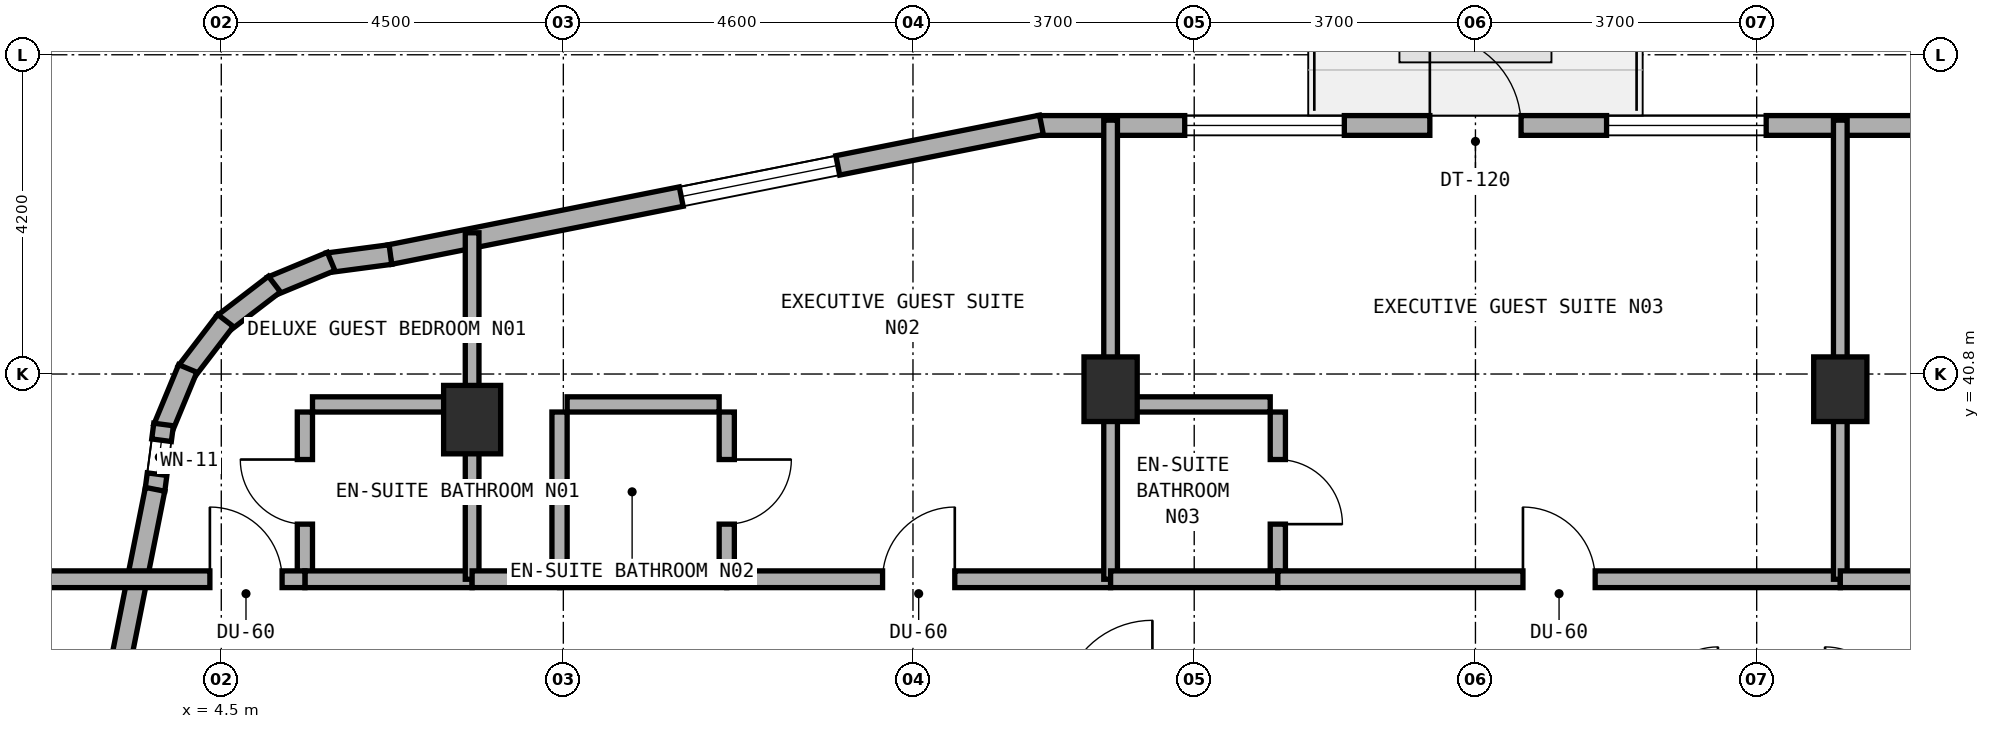
"""IFC4 building model, lengths in metres.
Left out: names, types, materials, properties, quantities, classifications, styles, units other than length and angle.
Written with IfcOpenShell. Run it as: python <this file> out.ifc"""

import sys

from ifc_helpers import new_model, si_unit, direction, frame, frame_2d, origin, origin_2d, place, context, subcontext, project, spatial, rectangle, extrude, element, fill, save


model = new_model("IFC4")
c1 = context("Model", 3, precision=1e-05, world=origin(), true_north=direction((0.0, 1.0)))
c2 = subcontext(c1, "Body", "Model", "MODEL_VIEW")
j1 = project(units=[si_unit("LENGTHUNIT", "METRE"), si_unit("PLANEANGLEUNIT", "RADIAN")], contexts=[c1])
p1 = place(None, origin())
s1 = spatial("IfcSite", under=j1, at=p1, CompositionType="ELEMENT")
p2 = place(p1, origin())
s2 = spatial("IfcBuilding", under=s1, at=p2, CompositionType="ELEMENT")
p3 = place(p2, frame((0.0, 0.0, 220.7)))
s3 = spatial("IfcBuildingStorey", under=s2, at=p3, CompositionType="ELEMENT", Elevation=220.7)
for number, where, z_axis, x_axis in (
    (1, (16.2, 40.6, 0.0), (0.0, 0.0, 1.0), (1.0, 0.0, 0.0)),
    (2, (25.8, 40.6, 0.0), (0.0, 0.0, 1.0), (1.0, 0.0, 0.0)),
):
    element("IfcColumn", number, at=place(p3, frame(where, z_axis=z_axis, x_axis=x_axis)), inside=s3, PredefinedType="COLUMN", context=c2, shape_type="SweptSolid", body=[
        extrude(rectangle(XDim=0.7, YDim=0.85, at=origin_2d()), origin(), (0.0, 0.0, 1.0), 3.6),
    ])
p4 = place(p3, frame((7.8, 40.2, 0.0), z_axis=(0.0, 0.0, 1.0), x_axis=(1.0, 0.0, 0.0)))
e3 = element("IfcColumn", 3, at=p4, inside=s3, PredefinedType="COLUMN", context=c2, shape_type="SweptSolid", body=[
    extrude(rectangle(XDim=0.75, YDim=0.9, at=origin_2d()), origin(), (0.0, 0.0, 1.0), 3.6),
])
p5 = place(p3, frame((35.283, 42.371, 0.0), z_axis=(0.0, 0.0, 1.0), x_axis=(-0.980748582507, 0.1952747242, 0.0)))
e4 = element("IfcWall", 4, at=p5, inside=s3, PredefinedType="STANDARD", context=c2, shape_type="SweptSolid", body=[
    extrude(rectangle(XDim=8.705, YDim=0.26, at=frame_2d((4.353, 0.0))), origin(), (0.0, 0.0, 1.0), 3.32),
])
p6 = place(p5, frame((3.892, 0.0, 0.85)))
e5 = element("IfcOpeningElement", 5, at=p6, cuts=e4, PredefinedType="OPENING", context=c2, shape_type="SweptSolid", body=[
    extrude(rectangle(XDim=2.1, YDim=1.5, at=frame_2d((1.05, 0.75))), frame((0.0, 0.14, 0.0), z_axis=(0.0, -1.0, 0.0), x_axis=(1.0, 0.0, 0.0)), (0.0, 0.0, 1.0), 0.28),
])
p7 = place(p3, frame((26.785, 44.07, 0.0), z_axis=(0.0, 0.0, 1.0), x_axis=(-1.0, 0.0, 0.0)))
e6 = element("IfcWall", 6, at=p7, inside=s3, PredefinedType="STANDARD", context=c2, shape_type="SweptSolid", body=[
    extrude(rectangle(XDim=11.535, YDim=0.26, at=frame_2d((5.768, 0.0))), origin(), (0.0, 0.0, 1.0), 3.32),
])
p8 = place(p7, frame((5.185, 0.0, 0.0)))
e7 = element("IfcOpeningElement", 7, at=p8, cuts=e6, PredefinedType="OPENING", context=c2, shape_type="SweptSolid", body=[
    extrude(rectangle(XDim=1.2, YDim=2.15, at=frame_2d((0.6, 1.075))), frame((0.0, 0.14, 0.0), z_axis=(0.0, -1.0, 0.0), x_axis=(1.0, 0.0, 0.0)), (0.0, 0.0, 1.0), 0.28),
])
p9 = place(p7, frame((1.96, 0.0, 0.85)))
e8 = element("IfcOpeningElement", 8, at=p9, cuts=e6, PredefinedType="OPENING", context=c2, shape_type="SweptSolid", body=[
    extrude(rectangle(XDim=2.1, YDim=1.5, at=frame_2d((1.05, 0.75))), frame((0.0, 0.14, 0.0), z_axis=(0.0, -1.0, 0.0), x_axis=(1.0, 0.0, 0.0)), (0.0, 0.0, 1.0), 0.28),
])
p10 = place(p7, frame((7.51, 0.0, 0.85)))
e9 = element("IfcOpeningElement", 9, at=p10, cuts=e6, PredefinedType="OPENING", context=c2, shape_type="SweptSolid", body=[
    extrude(rectangle(XDim=2.1, YDim=1.5, at=frame_2d((1.05, 0.75))), frame((0.0, 0.14, 0.0), z_axis=(0.0, -1.0, 0.0), x_axis=(1.0, 0.0, 0.0)), (0.0, 0.0, 1.0), 0.28),
])
p11 = place(p3, frame((15.29, 44.078, 0.0), z_axis=(0.0, 0.0, 1.0), x_axis=(-0.980752174324, -0.195256683773, 0.0)))
e10 = element("IfcWall", 10, at=p11, inside=s3, PredefinedType="STANDARD", context=c2, shape_type="SweptSolid", body=[
    extrude(rectangle(XDim=8.741, YDim=0.26, at=frame_2d((4.371, 0.0))), origin(), (0.0, 0.0, 1.0), 3.32),
])
p12 = place(p11, frame((2.732, 0.0, 0.85)))
e11 = element("IfcOpeningElement", 11, at=p12, cuts=e10, PredefinedType="OPENING", context=c2, shape_type="SweptSolid", body=[
    extrude(rectangle(XDim=2.1, YDim=1.5, at=frame_2d((1.05, 0.75))), frame((0.0, 0.14, 0.0), z_axis=(0.0, -1.0, 0.0), x_axis=(1.0, 0.0, 0.0)), (0.0, 0.0, 1.0), 0.28),
])
p13 = place(p3, frame((6.725, 42.372, 0.0), z_axis=(0.0, 0.0, 1.0), x_axis=(-0.9913883573, -0.130954667764, 0.0)))
e12 = element("IfcWall", 12, at=p13, inside=s3, PredefinedType="STANDARD", context=c2, shape_type="SweptSolid", body=[
    extrude(rectangle(XDim=0.833, YDim=0.26, at=frame_2d((0.417, 0.0))), origin(), (0.0, 0.0, 1.0), 3.32),
])
p14 = place(p3, frame((5.945, 42.281, 0.0), z_axis=(0.0, 0.0, 1.0), x_axis=(-0.923754491172, -0.382985169477, 0.0)))
e13 = element("IfcWall", 13, at=p14, inside=s3, PredefinedType="STANDARD", context=c2, shape_type="SweptSolid", body=[
    extrude(rectangle(XDim=0.851, YDim=0.26, at=frame_2d((0.426, 0.0))), origin(), (0.0, 0.0, 1.0), 3.32),
])
for number, where, z_axis, x_axis in (
    (14, (5.199, 41.983, 0.0), (0.0, 0.0, 1.0), (-0.794, -0.608, 0.0)),
    (15, (4.555, 41.504, 0.0), (0.0, 0.0, 1.0), (-0.608, -0.794, 0.0)),
):
    element("IfcWall", number, at=place(p3, frame(where, z_axis=z_axis, x_axis=x_axis)), inside=s3, PredefinedType="STANDARD", context=c2, shape_type="SweptSolid", body=[
        extrude(rectangle(XDim=0.85, YDim=0.26, at=frame_2d((0.425, 0.0))), origin(), (0.0, 0.0, 1.0), 3.32),
    ])
p15 = place(p3, frame((4.059, 40.873, 0.0), z_axis=(0.0, 0.0, 1.0), x_axis=(-0.383229930484, -0.923652976167, 0.0)))
e16 = element("IfcWall", 16, at=p15, inside=s3, PredefinedType="STANDARD", context=c2, shape_type="SweptSolid", body=[
    extrude(rectangle(XDim=0.851, YDim=0.26, at=frame_2d((0.426, 0.0))), origin(), (0.0, 0.0, 1.0), 3.32),
])
p16 = place(p3, frame((3.741, 40.136, 0.0), z_axis=(0.0, 0.0, 1.0), x_axis=(-0.130156359936, -0.991493480548, 0.0)))
e17 = element("IfcWall", 17, at=p16, inside=s3, PredefinedType="STANDARD", context=c2, shape_type="SweptSolid", body=[
    extrude(rectangle(XDim=0.868, YDim=0.26, at=frame_2d((0.434, 0.0))), origin(), (0.0, 0.0, 1.0), 3.32),
])
p17 = place(p16, frame((0.209, 0.0, 0.85)))
e18 = element("IfcOpeningElement", 18, at=p17, cuts=e17, PredefinedType="OPENING", context=c2, shape_type="SweptSolid", body=[
    extrude(rectangle(XDim=0.45, YDim=1.5, at=frame_2d((0.225, 0.75))), frame((0.0, 0.14, 0.0), z_axis=(0.0, -1.0, 0.0), x_axis=(1.0, 0.0, 0.0)), (0.0, 0.0, 1.0), 0.28),
])
p18 = place(p3, frame((3.629, 39.283, 0.0), z_axis=(0.0, 0.0, 1.0), x_axis=(-0.195291715883, -0.980745199176, 0.0)))
e19 = element("IfcWall", 19, at=p18, inside=s3, PredefinedType="STANDARD", context=c2, shape_type="SweptSolid", body=[
    extrude(rectangle(XDim=8.771, YDim=0.26, at=frame_2d((4.385, 0.0))), origin(), (0.0, 0.0, 1.0), 3.32),
])
p19 = place(p18, frame((4.0, 0.0, 0.85)))
e20 = element("IfcOpeningElement", 20, at=p19, cuts=e19, PredefinedType="OPENING", context=c2, shape_type="SweptSolid", body=[
    extrude(rectangle(XDim=2.1, YDim=1.5, at=frame_2d((1.05, 0.75))), frame((0.0, 0.14, 0.0), z_axis=(0.0, -1.0, 0.0), x_axis=(1.0, 0.0, 0.0)), (0.0, 0.0, 1.0), 0.28),
])
p20 = place(p3, frame((5.6, 38.2, 0.0), z_axis=(0.0, 0.0, 1.0), x_axis=(0.0, 1.0, 0.0)))
e21 = element("IfcWall", 21, at=p20, inside=s3, PredefinedType="PLUMBINGWALL", context=c2, shape_type="SweptSolid", body=[
    extrude(rectangle(XDim=2.1, YDim=0.2, at=frame_2d((1.05, 0.0))), origin(), (0.0, 0.0, 1.0), 3.32),
])
p21 = place(p20, frame((0.625, 0.0, 0.0)))
e22 = element("IfcOpeningElement", 22, at=p21, cuts=e21, PredefinedType="OPENING", context=c2, shape_type="SweptSolid", body=[
    extrude(rectangle(XDim=0.85, YDim=2.1, at=frame_2d((0.425, 1.05))), frame((0.0, 0.11, 0.0), z_axis=(0.0, -1.0, 0.0), x_axis=(1.0, 0.0, 0.0)), (0.0, 0.0, 1.0), 0.22),
])
p22 = place(p3, frame((5.7, 40.4, 0.0), z_axis=(0.0, 0.0, 1.0), x_axis=(1.0, 0.0, 0.0)))
e23 = element("IfcWall", 23, at=p22, inside=s3, PredefinedType="PLUMBINGWALL", context=c2, shape_type="SweptSolid", body=[
    extrude(rectangle(XDim=2.0, YDim=0.2, at=frame_2d((1.0, 0.0))), origin(), (0.0, 0.0, 1.0), 3.32),
])
p23 = place(p3, frame((5.6, 38.1, 0.0), z_axis=(0.0, 0.0, 1.0), x_axis=(1.0, 0.0, 0.0)))
e24 = element("IfcWall", 24, at=p23, inside=s3, PredefinedType="SOLIDWALL", context=c2, shape_type="SweptSolid", body=[
    extrude(rectangle(XDim=2.2, YDim=0.22, at=frame_2d((1.1, 0.0))), origin(), (0.0, 0.0, 1.0), 2.695),
])
p24 = place(p3, frame((1.96, 38.1, 0.0), z_axis=(0.0, 0.0, 1.0), x_axis=(1.0, 0.0, 0.0)))
e25 = element("IfcWall", 25, at=p24, inside=s3, PredefinedType="SOLIDWALL", context=c2, shape_type="SweptSolid", body=[
    extrude(rectangle(XDim=3.64, YDim=0.22, at=frame_2d((1.82, 0.0))), origin(), (0.0, 0.0, 1.0), 3.32),
])
p25 = place(p24, frame((2.39, 0.0, 0.0)))
e26 = element("IfcOpeningElement", 26, at=p25, cuts=e25, PredefinedType="OPENING", context=c2, shape_type="SweptSolid", body=[
    extrude(rectangle(XDim=0.95, YDim=2.1, at=frame_2d((0.475, 1.05))), frame((0.0, 0.12, 0.0), z_axis=(0.0, -1.0, 0.0), x_axis=(1.0, 0.0, 0.0)), (0.0, 0.0, 1.0), 0.24),
])
p26 = place(p3, frame((7.8, 38.1, 0.0), z_axis=(0.0, 0.0, 1.0), x_axis=(0.0, 1.0, 0.0)))
e27 = element("IfcWall", 27, at=p26, inside=s3, PredefinedType="SOLIDWALL", context=c2, shape_type="SweptSolid", body=[
    extrude(rectangle(XDim=4.558, YDim=0.18, at=frame_2d((2.279, 0.0))), origin(), (0.0, 0.0, 1.0), 2.695),
])
p27 = place(p3, frame((11.15, 38.2, 0.0), z_axis=(0.0, 0.0, 1.0), x_axis=(0.0, 1.0, 0.0)))
e28 = element("IfcWall", 28, at=p27, inside=s3, PredefinedType="PLUMBINGWALL", context=c2, shape_type="SweptSolid", body=[
    extrude(rectangle(XDim=2.1, YDim=0.2, at=frame_2d((1.05, 0.0))), origin(), (0.0, 0.0, 1.0), 3.015),
])
p28 = place(p27, frame((0.625, 0.0, 0.0)))
e29 = element("IfcOpeningElement", 29, at=p28, cuts=e28, PredefinedType="OPENING", context=c2, shape_type="SweptSolid", body=[
    extrude(rectangle(XDim=0.85, YDim=2.1, at=frame_2d((0.425, 1.05))), frame((0.0, 0.11, 0.0), z_axis=(0.0, -1.0, 0.0), x_axis=(1.0, 0.0, 0.0)), (0.0, 0.0, 1.0), 0.22),
])
p29 = place(p3, frame((9.05, 40.4, 0.0), z_axis=(0.0, 0.0, 1.0), x_axis=(1.0, 0.0, 0.0)))
e30 = element("IfcWall", 30, at=p29, inside=s3, PredefinedType="PLUMBINGWALL", context=c2, shape_type="SweptSolid", body=[
    extrude(rectangle(XDim=2.0, YDim=0.2, at=frame_2d((1.0, 0.0))), origin(), (0.0, 0.0, 1.0), 3.015),
])
p30 = place(p3, frame((8.95, 38.2, 0.0), z_axis=(0.0, 0.0, 1.0), x_axis=(0.0, 1.0, 0.0)))
e31 = element("IfcWall", 31, at=p30, inside=s3, PredefinedType="PLUMBINGWALL", context=c2, shape_type="SweptSolid", body=[
    extrude(rectangle(XDim=2.1, YDim=0.2, at=frame_2d((1.05, 0.0))), origin(), (0.0, 0.0, 1.0), 3.015),
])
p31 = place(p3, frame((7.8, 38.1, 0.0), z_axis=(0.0, 0.0, 1.0), x_axis=(1.0, 0.0, 0.0)))
e32 = element("IfcWall", 32, at=p31, inside=s3, PredefinedType="SOLIDWALL", context=c2, shape_type="SweptSolid", body=[
    extrude(rectangle(XDim=1.15, YDim=0.22, at=frame_2d((0.575, 0.0))), origin(), (0.0, 0.0, 1.0), 2.695),
])
p32 = place(p3, frame((8.95, 38.1, 0.0), z_axis=(0.0, 0.0, 1.0), x_axis=(1.0, 0.0, 0.0)))
e33 = element("IfcWall", 33, at=p32, inside=s3, PredefinedType="SOLIDWALL", context=c2, shape_type="SweptSolid", body=[
    extrude(rectangle(XDim=2.2, YDim=0.22, at=frame_2d((1.1, 0.0))), origin(), (0.0, 0.0, 1.0), 3.32),
])
p33 = place(p3, frame((11.15, 38.1, 0.0), z_axis=(0.0, 0.0, 1.0), x_axis=(1.0, 0.0, 0.0)))
e34 = element("IfcWall", 34, at=p33, inside=s3, PredefinedType="SOLIDWALL", context=c2, shape_type="SweptSolid", body=[
    extrude(rectangle(XDim=5.05, YDim=0.22, at=frame_2d((2.525, 0.0))), origin(), (0.0, 0.0, 1.0), 2.695),
])
p34 = place(p33, frame((2.05, 0.0, 0.0)))
e35 = element("IfcOpeningElement", 35, at=p34, cuts=e34, PredefinedType="OPENING", context=c2, shape_type="SweptSolid", body=[
    extrude(rectangle(XDim=0.95, YDim=2.1, at=frame_2d((0.475, 1.05))), frame((0.0, 0.12, 0.0), z_axis=(0.0, -1.0, 0.0), x_axis=(1.0, 0.0, 0.0)), (0.0, 0.0, 1.0), 0.24),
])
p35 = place(p3, frame((16.2, 38.1, 0.0), z_axis=(0.0, 0.0, 1.0), x_axis=(0.0, 1.0, 0.0)))
e36 = element("IfcWall", 36, at=p35, inside=s3, PredefinedType="SOLIDWALL", context=c2, shape_type="SweptSolid", body=[
    extrude(rectangle(XDim=6.04, YDim=0.18, at=frame_2d((3.02, 0.0))), origin(), (0.0, 0.0, 1.0), 2.695),
])
p36 = place(p3, frame((18.4, 38.2, 0.0), z_axis=(0.0, 0.0, 1.0), x_axis=(0.0, 1.0, 0.0)))
e37 = element("IfcWall", 37, at=p36, inside=s3, PredefinedType="PLUMBINGWALL", context=c2, shape_type="SweptSolid", body=[
    extrude(rectangle(XDim=2.1, YDim=0.2, at=frame_2d((1.05, 0.0))), origin(), (0.0, 0.0, 1.0), 3.025),
])
p37 = place(p36, frame((0.625, 0.0, 0.0)))
e38 = element("IfcOpeningElement", 38, at=p37, cuts=e37, PredefinedType="OPENING", context=c2, shape_type="SweptSolid", body=[
    extrude(rectangle(XDim=0.85, YDim=2.1, at=frame_2d((0.425, 1.05))), frame((0.0, 0.11, 0.0), z_axis=(0.0, -1.0, 0.0), x_axis=(1.0, 0.0, 0.0)), (0.0, 0.0, 1.0), 0.22),
])
p38 = place(p3, frame((16.3, 40.4, 0.0), z_axis=(0.0, 0.0, 1.0), x_axis=(1.0, 0.0, 0.0)))
e39 = element("IfcWall", 39, at=p38, inside=s3, PredefinedType="PLUMBINGWALL", context=c2, shape_type="SweptSolid", body=[
    extrude(rectangle(XDim=2.0, YDim=0.2, at=frame_2d((1.0, 0.0))), origin(), (0.0, 0.0, 1.0), 3.015),
])
p39 = place(p3, frame((16.2, 38.1, 0.0), z_axis=(0.0, 0.0, 1.0), x_axis=(1.0, 0.0, 0.0)))
e40 = element("IfcWall", 40, at=p39, inside=s3, PredefinedType="SOLIDWALL", context=c2, shape_type="SweptSolid", body=[
    extrude(rectangle(XDim=2.2, YDim=0.22, at=frame_2d((1.1, 0.0))), origin(), (0.0, 0.0, 1.0), 2.695),
])
p40 = place(p3, frame((18.4, 38.1, 0.0), z_axis=(0.0, 0.0, 1.0), x_axis=(1.0, 0.0, 0.0)))
e41 = element("IfcWall", 41, at=p40, inside=s3, PredefinedType="SOLIDWALL", context=c2, shape_type="SweptSolid", body=[
    extrude(rectangle(XDim=7.4, YDim=0.22, at=frame_2d((3.7, 0.0))), origin(), (0.0, 0.0, 1.0), 2.695),
])
p41 = place(p40, frame((3.225, 0.0, 0.0)))
e42 = element("IfcOpeningElement", 42, at=p41, cuts=e41, PredefinedType="OPENING", context=c2, shape_type="SweptSolid", body=[
    extrude(rectangle(XDim=0.95, YDim=2.1, at=frame_2d((0.475, 1.05))), frame((0.0, 0.12, 0.0), z_axis=(0.0, -1.0, 0.0), x_axis=(1.0, 0.0, 0.0)), (0.0, 0.0, 1.0), 0.24),
])
p42 = place(p3, frame((25.8, 38.1, 0.0), z_axis=(0.0, 0.0, 1.0), x_axis=(0.0, 1.0, 0.0)))
e43 = element("IfcWall", 43, at=p42, inside=s3, PredefinedType="SOLIDWALL", context=c2, shape_type="SweptSolid", body=[
    extrude(rectangle(XDim=6.04, YDim=0.18, at=frame_2d((3.02, 0.0))), origin(), (0.0, 0.0, 1.0), 2.695),
])
p43 = place(p3, frame((25.8, 38.1, 0.0), z_axis=(0.0, 0.0, 1.0), x_axis=(1.0, 0.0, 0.0)))
e44 = element("IfcWall", 44, at=p43, inside=s3, PredefinedType="SOLIDWALL", context=c2, shape_type="SweptSolid", body=[
    extrude(rectangle(XDim=5.05, YDim=0.22, at=frame_2d((2.525, 0.0))), origin(), (0.0, 0.0, 1.0), 2.695),
])
p44 = place(p43, frame((2.05, 0.0, 0.0)))
e45 = element("IfcOpeningElement", 45, at=p44, cuts=e44, PredefinedType="OPENING", context=c2, shape_type="SweptSolid", body=[
    extrude(rectangle(XDim=0.95, YDim=2.1, at=frame_2d((0.475, 1.05))), frame((0.0, 0.12, 0.0), z_axis=(0.0, -1.0, 0.0), x_axis=(1.0, 0.0, 0.0)), (0.0, 0.0, 1.0), 0.24),
])
p45 = place(p8, frame((1.2, 0.0, 0.0), z_axis=(0.0, 0.0, 1.0), x_axis=(-1.0, 0.0, 0.0)))
e46 = element("IfcDoor", 46, at=p45, inside=s3, OperationType="SINGLE_SWING_LEFT", PredefinedType="DOOR", context=c2, shape_type="SweptSolid", body=[
    extrude(rectangle(XDim=1.2, YDim=2.15, at=frame_2d((0.6, 1.075))), frame((0.0, 0.025, 0.0), z_axis=(0.0, -1.0, 0.0), x_axis=(1.0, 0.0, 0.0)), (0.0, 0.0, 1.0), 0.05),
])
fill(e7, e46)
p46 = place(p9, origin())
e47 = element("IfcWindow", 47, at=p46, inside=s3, PartitioningType="SINGLE_PANEL", PredefinedType="WINDOW", context=c2, shape_type="SweptSolid", body=[
    extrude(rectangle(XDim=2.1, YDim=1.5, at=frame_2d((1.05, 0.75))), frame((0.0, 0.03, 0.0), z_axis=(0.0, -1.0, 0.0), x_axis=(1.0, 0.0, 0.0)), (0.0, 0.0, 1.0), 0.06),
])
fill(e8, e47)
p47 = place(p10, origin())
e48 = element("IfcWindow", 48, at=p47, inside=s3, PartitioningType="SINGLE_PANEL", PredefinedType="WINDOW", context=c2, shape_type="SweptSolid", body=[
    extrude(rectangle(XDim=2.1, YDim=1.5, at=frame_2d((1.05, 0.75))), frame((0.0, 0.03, 0.0), z_axis=(0.0, -1.0, 0.0), x_axis=(1.0, 0.0, 0.0)), (0.0, 0.0, 1.0), 0.06),
])
fill(e9, e48)
p48 = place(p12, origin())
e49 = element("IfcWindow", 49, at=p48, inside=s3, PartitioningType="SINGLE_PANEL", PredefinedType="WINDOW", context=c2, shape_type="SweptSolid", body=[
    extrude(rectangle(XDim=2.1, YDim=1.5, at=frame_2d((1.05, 0.75))), frame((0.0, 0.03, 0.0), z_axis=(0.0, -1.0, 0.0), x_axis=(1.0, 0.0, 0.0)), (0.0, 0.0, 1.0), 0.06),
])
fill(e11, e49)
p49 = place(p17, origin())
e50 = element("IfcWindow", 50, at=p49, inside=s3, PartitioningType="SINGLE_PANEL", PredefinedType="WINDOW", context=c2, shape_type="SweptSolid", body=[
    extrude(rectangle(XDim=0.45, YDim=1.5, at=frame_2d((0.225, 0.75))), frame((0.0, 0.03, 0.0), z_axis=(0.0, -1.0, 0.0), x_axis=(1.0, 0.0, 0.0)), (0.0, 0.0, 1.0), 0.06),
])
fill(e18, e50)
p50 = place(p21, origin())
e51 = element("IfcDoor", 51, at=p50, inside=s3, OperationType="SINGLE_SWING_RIGHT", PredefinedType="DOOR", context=c2, shape_type="SweptSolid", body=[
    extrude(rectangle(XDim=0.85, YDim=2.1, at=frame_2d((0.425, 1.05))), frame((0.0, 0.025, 0.0), z_axis=(0.0, -1.0, 0.0), x_axis=(1.0, 0.0, 0.0)), (0.0, 0.0, 1.0), 0.05),
])
fill(e22, e51)
p51 = place(p25, origin())
e52 = element("IfcDoor", 52, at=p51, inside=s3, OperationType="SINGLE_SWING_LEFT", PredefinedType="DOOR", context=c2, shape_type="SweptSolid", body=[
    extrude(rectangle(XDim=0.95, YDim=2.1, at=frame_2d((0.475, 1.05))), frame((0.0, 0.025, 0.0), z_axis=(0.0, -1.0, 0.0), x_axis=(1.0, 0.0, 0.0)), (0.0, 0.0, 1.0), 0.05),
])
fill(e26, e52)
p52 = place(p28, frame((0.85, 0.0, 0.0), z_axis=(0.0, 0.0, 1.0), x_axis=(-1.0, 0.0, 0.0)))
e53 = element("IfcDoor", 53, at=p52, inside=s3, OperationType="SINGLE_SWING_LEFT", PredefinedType="DOOR", context=c2, shape_type="SweptSolid", body=[
    extrude(rectangle(XDim=0.85, YDim=2.1, at=frame_2d((0.425, 1.05))), frame((0.0, 0.025, 0.0), z_axis=(0.0, -1.0, 0.0), x_axis=(1.0, 0.0, 0.0)), (0.0, 0.0, 1.0), 0.05),
])
fill(e29, e53)
p53 = place(p34, origin())
e54 = element("IfcDoor", 54, at=p53, inside=s3, OperationType="SINGLE_SWING_RIGHT", PredefinedType="DOOR", context=c2, shape_type="SweptSolid", body=[
    extrude(rectangle(XDim=0.95, YDim=2.1, at=frame_2d((0.475, 1.05))), frame((0.0, 0.025, 0.0), z_axis=(0.0, -1.0, 0.0), x_axis=(1.0, 0.0, 0.0)), (0.0, 0.0, 1.0), 0.05),
])
fill(e35, e54)
p54 = place(p37, frame((0.85, 0.0, 0.0), z_axis=(0.0, 0.0, 1.0), x_axis=(-1.0, 0.0, 0.0)))
e55 = element("IfcDoor", 55, at=p54, inside=s3, OperationType="SINGLE_SWING_RIGHT", PredefinedType="DOOR", context=c2, shape_type="SweptSolid", body=[
    extrude(rectangle(XDim=0.85, YDim=2.1, at=frame_2d((0.425, 1.05))), frame((0.0, 0.025, 0.0), z_axis=(0.0, -1.0, 0.0), x_axis=(1.0, 0.0, 0.0)), (0.0, 0.0, 1.0), 0.05),
])
fill(e38, e55)
p55 = place(p41, origin())
e56 = element("IfcDoor", 56, at=p55, inside=s3, OperationType="SINGLE_SWING_LEFT", PredefinedType="DOOR", context=c2, shape_type="SweptSolid", body=[
    extrude(rectangle(XDim=0.95, YDim=2.1, at=frame_2d((0.475, 1.05))), frame((0.0, 0.025, 0.0), z_axis=(0.0, -1.0, 0.0), x_axis=(1.0, 0.0, 0.0)), (0.0, 0.0, 1.0), 0.05),
])
fill(e42, e56)
save(model, sys.argv[1])
